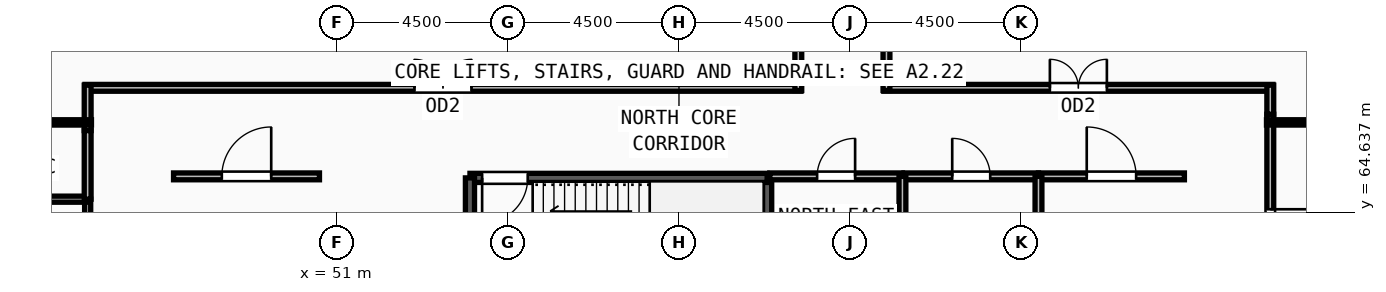
"""IFC4 building model, lengths in metres.
Left out: names, types, materials, properties, quantities, classifications, styles, units other than length and angle.
Written with IfcOpenShell. Run it as: python <this file> out.ifc"""

import sys

from ifc_helpers import new_model, si_unit, direction, frame, frame_2d, origin, place, context, subcontext, project, spatial, rectangle, extrude, source, transform, mapped, element, fill, save


model = new_model("IFC4")
c1 = context("Model", 3, precision=1e-05, world=origin(), true_north=direction((0.0, 1.0)))
c2 = subcontext(c1, "Body", "Model", "MODEL_VIEW")
j1 = project(units=[si_unit("LENGTHUNIT", "METRE"), si_unit("PLANEANGLEUNIT", "RADIAN")], contexts=[c1])
p1 = place(None, origin())
s1 = spatial("IfcSite", under=j1, at=p1, CompositionType="ELEMENT")
p2 = place(p1, origin())
s2 = spatial("IfcBuilding", under=s1, at=p2, CompositionType="ELEMENT")
p3 = place(p2, frame((0.0, 0.0, 258.75)))
s3 = spatial("IfcBuildingStorey", under=s2, at=p3, CompositionType="ELEMENT", Elevation=258.75)
p4 = place(p3, frame((62.32, 62.1, 0.0), z_axis=(0.0, 0.0, 1.0), x_axis=(0.0, 1.0, 0.0)))
e1 = element("IfcWall", 1, at=p4, inside=s3, PredefinedType="SOLIDWALL", context=c2, shape_type="SweptSolid", body=[
    extrude(rectangle(XDim=3.44, YDim=0.24, at=frame_2d((1.72, 0.0))), origin(), (0.0, 0.0, 1.0), 3.57),
])
p5 = place(p3, frame((62.32, 65.54, 0.0), z_axis=(0.0, 0.0, 1.0), x_axis=(-1.0, 0.0, 0.0)))
e2 = element("IfcWall", 2, at=p5, inside=s3, PredefinedType="SOLIDWALL", context=c2, shape_type="SweptSolid", body=[
    extrude(rectangle(XDim=7.82, YDim=0.24, at=frame_2d((3.91, 0.0))), origin(), (0.0, 0.0, 1.0), 3.57),
])
m1 = source(origin(), c2, "Body", "SweptSolid", [
    extrude(rectangle(XDim=1.2, YDim=2.2, at=frame_2d((0.6, 1.1))), frame((0.0, 0.13, 0.0), z_axis=(0.0, -1.0, 0.0), x_axis=(1.0, 0.0, 0.0)), (0.0, 0.0, 1.0), 0.26),
])
p6 = place(p5, frame((6.3, 0.0, 0.0)))
e3 = element("IfcOpeningElement", 3, at=p6, cuts=e2, PredefinedType="OPENING", context=c2, shape_type="MappedRepresentation", body=[
    mapped(m1, transform((0.0, 0.0, 0.0), x_axis=(1.0, 0.0, 0.0), y_axis=(0.0, 1.0, 0.0), z_axis=(0.0, 0.0, 1.0), scale=1.0)),
])
p7 = place(p3, frame((54.5, 65.54, 0.0), z_axis=(0.0, 0.0, 1.0), x_axis=(0.0, -1.0, 0.0)))
e4 = element("IfcWall", 4, at=p7, inside=s3, PredefinedType="SOLIDWALL", context=c2, shape_type="SweptSolid", body=[
    extrude(rectangle(XDim=3.44, YDim=0.24, at=frame_2d((1.72, 0.0))), origin(), (0.0, 0.0, 1.0), 3.57),
])
p8 = place(p3, frame((44.44, 62.24, 0.0), z_axis=(0.0, 0.0, 1.0), x_axis=(0.0, 1.0, 0.0)))
e5 = element("IfcWall", 5, at=p8, inside=s3, PredefinedType="PARTITIONING", context=c2, shape_type="SweptSolid", body=[
    extrude(rectangle(XDim=2.74, YDim=0.16, at=frame_2d((1.37, 0.0))), origin(), (0.0, 0.0, 1.0), 3.57),
])
m2 = source(origin(), c2, "Body", "SweptSolid", [
    extrude(rectangle(XDim=1.05, YDim=2.15, at=frame_2d((0.525, 1.075))), frame((0.0, 0.09, 0.0), z_axis=(0.0, -1.0, 0.0), x_axis=(1.0, 0.0, 0.0)), (0.0, 0.0, 1.0), 0.18),
])
p9 = place(p8, frame((0.845, 0.0, 0.0)))
e6 = element("IfcOpeningElement", 6, at=p9, cuts=e5, PredefinedType="OPENING", context=c2, shape_type="MappedRepresentation", body=[
    mapped(m2, transform((0.0, 0.0, 0.0), x_axis=(1.0, 0.0, 0.0), y_axis=(0.0, 1.0, 0.0), z_axis=(0.0, 0.0, 1.0), scale=1.0)),
])
p10 = place(p3, frame((62.39, 65.58, 0.0), z_axis=(0.0, 0.0, 1.0), x_axis=(1.0, 0.0, 0.0)))
e7 = element("IfcWall", 7, at=p10, inside=s3, PredefinedType="PARTITIONING", context=c2, shape_type="SweptSolid", body=[
    extrude(rectangle(XDim=3.49, YDim=0.18, at=frame_2d((1.745, 0.0))), origin(), (0.0, 0.0, 1.0), 3.57),
])
m3 = source(origin(), c2, "Body", "SweptSolid", [
    extrude(rectangle(XDim=1.0, YDim=2.2, at=frame_2d((0.5, 1.1))), frame((0.0, 0.1, 0.0), z_axis=(0.0, -1.0, 0.0), x_axis=(1.0, 0.0, 0.0)), (0.0, 0.0, 1.0), 0.2),
])
p11 = place(p10, frame((1.245, 0.0, 0.0)))
e8 = element("IfcOpeningElement", 8, at=p11, cuts=e7, PredefinedType="OPENING", context=c2, shape_type="MappedRepresentation", body=[
    mapped(m3, transform((0.0, 0.0, 0.0), x_axis=(1.0, 0.0, 0.0), y_axis=(0.0, 1.0, 0.0), z_axis=(0.0, 0.0, 1.0), scale=1.0)),
])
p12 = place(p3, frame((65.92, 65.58, 0.0), z_axis=(0.0, 0.0, 1.0), x_axis=(1.0, 0.0, 0.0)))
e9 = element("IfcWall", 9, at=p12, inside=s3, PredefinedType="PARTITIONING", context=c2, shape_type="SweptSolid", body=[
    extrude(rectangle(XDim=3.54, YDim=0.18, at=frame_2d((1.77, 0.0))), origin(), (0.0, 0.0, 1.0), 3.57),
])
p13 = place(p12, frame((1.27, 0.0, 0.0)))
e10 = element("IfcOpeningElement", 10, at=p13, cuts=e9, PredefinedType="OPENING", context=c2, shape_type="MappedRepresentation", body=[
    mapped(m3, transform((0.0, 0.0, 0.0), x_axis=(1.0, 0.0, 0.0), y_axis=(0.0, 1.0, 0.0), z_axis=(0.0, 0.0, 1.0), scale=1.0)),
])
p14 = place(p3, frame((46.7, 65.58, 0.0), z_axis=(0.0, 0.0, 1.0), x_axis=(1.0, 0.0, 0.0)))
e11 = element("IfcWall", 11, at=p14, inside=s3, PredefinedType="PARTITIONING", context=c2, shape_type="SweptSolid", body=[
    extrude(rectangle(XDim=3.84, YDim=0.18, at=frame_2d((1.92, 0.0))), origin(), (0.0, 0.0, 1.0), 3.57),
])
m4 = source(origin(), c2, "Body", "SweptSolid", [
    extrude(rectangle(XDim=1.3, YDim=2.2, at=frame_2d((0.65, 1.1))), frame((0.0, 0.1, 0.0), z_axis=(0.0, -1.0, 0.0), x_axis=(1.0, 0.0, 0.0)), (0.0, 0.0, 1.0), 0.2),
])
p15 = place(p14, frame((1.27, 0.0, 0.0)))
e12 = element("IfcOpeningElement", 12, at=p15, cuts=e11, PredefinedType="OPENING", context=c2, shape_type="MappedRepresentation", body=[
    mapped(m4, transform((0.0, 0.0, 0.0), x_axis=(1.0, 0.0, 0.0), y_axis=(0.0, 1.0, 0.0), z_axis=(0.0, 0.0, 1.0), scale=1.0)),
])
p16 = place(p3, frame((69.46, 65.58, 0.0), z_axis=(0.0, 0.0, 1.0), x_axis=(1.0, 0.0, 0.0)))
e13 = element("IfcWall", 13, at=p16, inside=s3, PredefinedType="PARTITIONING", context=c2, shape_type="SweptSolid", body=[
    extrude(rectangle(XDim=3.84, YDim=0.18, at=frame_2d((1.92, 0.0))), origin(), (0.0, 0.0, 1.0), 3.57),
])
p17 = place(p16, frame((1.27, 0.0, 0.0)))
e14 = element("IfcOpeningElement", 14, at=p17, cuts=e13, PredefinedType="OPENING", context=c2, shape_type="MappedRepresentation", body=[
    mapped(m4, transform((0.0, 0.0, 0.0), x_axis=(1.0, 0.0, 0.0), y_axis=(0.0, 1.0, 0.0), z_axis=(0.0, 0.0, 1.0), scale=1.0)),
])
p18 = place(p3, frame((75.56, 67.215, 0.0), z_axis=(0.0, 0.0, 1.0), x_axis=(0.0, -1.0, 0.0)))
e15 = element("IfcWall", 15, at=p18, inside=s3, PredefinedType="PARTITIONING", context=c2, shape_type="SweptSolid", body=[
    extrude(rectangle(XDim=6.0, YDim=0.18, at=frame_2d((3.0, 0.0))), origin(), (0.0, 0.0, 1.0), 3.57),
])
p19 = place(p18, frame((2.5, 0.0, 0.0)))
e16 = element("IfcOpeningElement", 16, at=p19, cuts=e15, PredefinedType="OPENING", context=c2, shape_type="MappedRepresentation", body=[
    mapped(m3, transform((0.0, 0.0, 0.0), x_axis=(1.0, 0.0, 0.0), y_axis=(0.0, 1.0, 0.0), z_axis=(0.0, 0.0, 1.0), scale=1.0)),
])
p20 = place(p3, frame((65.39, 67.91, 0.0), z_axis=(0.0, 0.0, 1.0), x_axis=(1.0, 0.0, 0.0)))
e17 = element("IfcWall", 17, at=p20, inside=s3, PredefinedType="PARTITIONING", context=c2, shape_type="SweptSolid", body=[
    extrude(rectangle(XDim=10.24, YDim=0.18, at=frame_2d((5.12, 0.0))), origin(), (0.0, 0.0, 1.0), 3.205),
])
m5 = source(origin(), c2, "Body", "SweptSolid", [
    extrude(rectangle(XDim=1.5, YDim=2.2, at=frame_2d((0.75, 1.1))), frame((0.0, 0.1, 0.0), z_axis=(0.0, -1.0, 0.0), x_axis=(1.0, 0.0, 0.0)), (0.0, 0.0, 1.0), 0.2),
])
p21 = place(p20, frame((4.37, 0.0, 0.0)))
e18 = element("IfcOpeningElement", 18, at=p21, cuts=e17, PredefinedType="OPENING", context=c2, shape_type="MappedRepresentation", body=[
    mapped(m5, transform((0.0, 0.0, 0.0), x_axis=(1.0, 0.0, 0.0), y_axis=(0.0, 1.0, 0.0), z_axis=(0.0, 0.0, 1.0), scale=1.0)),
])
p22 = place(p3, frame((44.37, 67.91, 0.0), z_axis=(0.0, 0.0, 1.0), x_axis=(1.0, 0.0, 0.0)))
e19 = element("IfcWall", 19, at=p22, inside=s3, PredefinedType="PARTITIONING", context=c2, shape_type="SweptSolid", body=[
    extrude(rectangle(XDim=18.84, YDim=0.18, at=frame_2d((9.42, 0.0))), origin(), (0.0, 0.0, 1.0), 3.205),
])
p23 = place(p22, frame((8.67, 0.0, 0.0)))
e20 = element("IfcOpeningElement", 20, at=p23, cuts=e19, PredefinedType="OPENING", context=c2, shape_type="MappedRepresentation", body=[
    mapped(m5, transform((0.0, 0.0, 0.0), x_axis=(1.0, 0.0, 0.0), y_axis=(0.0, 1.0, 0.0), z_axis=(0.0, 0.0, 1.0), scale=1.0)),
])
p24 = place(p3, frame((39.98, 64.98, 0.0), z_axis=(0.0, 0.0, 1.0), x_axis=(1.0, 0.0, 0.0)))
e21 = element("IfcWall", 21, at=p24, inside=s3, PredefinedType="PARTITIONING", context=c2, shape_type="SweptSolid", body=[
    extrude(rectangle(XDim=4.46, YDim=0.16, at=frame_2d((2.23, 0.0))), origin(), (0.0, 0.0, 1.0), 3.57),
])
p25 = place(p3, frame((65.88, 61.825, 0.0), z_axis=(0.0, 0.0, 1.0), x_axis=(0.0, 1.0, 0.0)))
e22 = element("IfcWall", 22, at=p25, inside=s3, PredefinedType="PARTITIONING", context=c2, shape_type="SweptSolid", body=[
    extrude(rectangle(XDim=3.755, YDim=0.18, at=frame_2d((1.877, 0.0))), origin(), (0.0, 0.0, 1.0), 3.57),
])
p26 = place(p3, frame((69.46, 61.95, 0.0), z_axis=(0.0, 0.0, 1.0), x_axis=(0.0, 1.0, 0.0)))
e23 = element("IfcWall", 23, at=p26, inside=s3, PredefinedType="PARTITIONING", context=c2, shape_type="SweptSolid", body=[
    extrude(rectangle(XDim=3.63, YDim=0.18, at=frame_2d((1.815, 0.0))), origin(), (0.0, 0.0, 1.0), 3.57),
])
p27 = place(p3, frame((65.46, 77.455, 0.0), z_axis=(0.0, 0.0, 1.0), x_axis=(0.0, -1.0, 0.0)))
e24 = element("IfcWall", 24, at=p27, inside=s3, PredefinedType="PARTITIONING", context=c2, shape_type="SweptSolid", body=[
    extrude(rectangle(XDim=9.615, YDim=0.18, at=frame_2d((4.808, 0.0))), origin(), (0.0, 0.0, 1.0), 3.57),
])
p28 = place(p3, frame((75.56, 67.98, 0.0), z_axis=(0.0, 0.0, 1.0), x_axis=(0.0, -1.0, 0.0)))
e25 = element("IfcWall", 25, at=p28, inside=s3, PredefinedType="PARTITIONING", context=c2, shape_type="SweptSolid", body=[
    extrude(rectangle(XDim=0.765, YDim=0.18, at=frame_2d((0.382, 0.0))), origin(), (0.0, 0.0, 1.0), 3.57),
])
p29 = place(p3, frame((63.14, 67.84, 0.0), z_axis=(0.0, 0.0, 1.0), x_axis=(0.0, 1.0, 0.0)))
e26 = element("IfcWall", 26, at=p29, inside=s3, PredefinedType="PARTITIONING", context=c2, shape_type="SweptSolid", body=[
    extrude(rectangle(XDim=9.795, YDim=0.18, at=frame_2d((4.897, 0.0))), origin(), (0.0, 0.0, 1.0), 3.57),
])
p30 = place(p3, frame((44.44, 66.785, 0.0), z_axis=(0.0, 0.0, 1.0), x_axis=(0.0, 1.0, 0.0)))
e27 = element("IfcWall", 27, at=p30, inside=s3, PredefinedType="PARTITIONING", context=c2, shape_type="SweptSolid", body=[
    extrude(rectangle(XDim=1.195, YDim=0.18, at=frame_2d((0.598, 0.0))), origin(), (0.0, 0.0, 1.0), 3.57),
])
p31 = place(p3, frame((44.44, 64.98, 0.0), z_axis=(0.0, 0.0, 1.0), x_axis=(0.0, 1.0, 0.0)))
e28 = element("IfcWall", 28, at=p31, inside=s3, PredefinedType="PARTITIONING", context=c2, shape_type="SweptSolid", body=[
    extrude(rectangle(XDim=1.805, YDim=0.18, at=frame_2d((0.902, 0.0))), origin(), (0.0, 0.0, 1.0), 3.57),
])
for number, where, z_axis, x_axis in (
    (29, (44.54, 67.0, 0.0), (0.0, 0.0, 1.0), (-1.0, 0.0, 0.0)),
    (30, (75.46, 67.0, 0.0), (0.0, 0.0, 1.0), (1.0, 0.0, 0.0)),
):
    element("IfcWall", number, at=place(p3, frame(where, z_axis=z_axis, x_axis=x_axis)), inside=s3, PredefinedType="PARTITIONING", context=c2, shape_type="SweptSolid", body=[
        extrude(rectangle(XDim=16.449, YDim=0.14, at=frame_2d((8.225, 0.0))), origin(), (0.0, 0.0, 1.0), 3.57),
    ])
m6 = source(origin(), c2, "Body", "SweptSolid", [
    extrude(rectangle(XDim=1.2, YDim=2.2, at=frame_2d((0.6, 1.1))), frame((0.0, 0.025, 0.0), z_axis=(0.0, -1.0, 0.0), x_axis=(1.0, 0.0, 0.0)), (0.0, 0.0, 1.0), 0.05),
])
p32 = place(p6, origin())
e31 = element("IfcDoor", 31, at=p32, inside=s3, OperationType="SINGLE_SWING_RIGHT", PredefinedType="DOOR", context=c2, shape_type="MappedRepresentation", body=[
    mapped(m6, transform((0.0, 0.0, 0.0), x_axis=(1.0, 0.0, 0.0), y_axis=(0.0, 1.0, 0.0), z_axis=(0.0, 0.0, 1.0), scale=1.0)),
])
fill(e3, e31)
m7 = source(origin(), c2, "Body", "SweptSolid", [
    extrude(rectangle(XDim=1.0, YDim=2.2, at=frame_2d((0.5, 1.1))), frame((0.0, 0.025, 0.0), z_axis=(0.0, -1.0, 0.0), x_axis=(1.0, 0.0, 0.0)), (0.0, 0.0, 1.0), 0.05),
])
p33 = place(p11, origin())
e32 = element("IfcDoor", 32, at=p33, inside=s3, OperationType="SINGLE_SWING_RIGHT", PredefinedType="DOOR", context=c2, shape_type="MappedRepresentation", body=[
    mapped(m7, transform((0.0, 0.0, 0.0), x_axis=(1.0, 0.0, 0.0), y_axis=(0.0, 1.0, 0.0), z_axis=(0.0, 0.0, 1.0), scale=1.0)),
])
fill(e8, e32)
p34 = place(p13, origin())
e33 = element("IfcDoor", 33, at=p34, inside=s3, OperationType="SINGLE_SWING_LEFT", PredefinedType="DOOR", context=c2, shape_type="MappedRepresentation", body=[
    mapped(m7, transform((0.0, 0.0, 0.0), x_axis=(1.0, 0.0, 0.0), y_axis=(0.0, 1.0, 0.0), z_axis=(0.0, 0.0, 1.0), scale=1.0)),
])
fill(e10, e33)
m8 = source(origin(), c2, "Body", "SweptSolid", [
    extrude(rectangle(XDim=1.3, YDim=2.2, at=frame_2d((0.65, 1.1))), frame((0.0, 0.025, 0.0), z_axis=(0.0, -1.0, 0.0), x_axis=(1.0, 0.0, 0.0)), (0.0, 0.0, 1.0), 0.05),
])
p35 = place(p15, origin())
e34 = element("IfcDoor", 34, at=p35, inside=s3, OperationType="SINGLE_SWING_RIGHT", PredefinedType="DOOR", context=c2, shape_type="MappedRepresentation", body=[
    mapped(m8, transform((0.0, 0.0, 0.0), x_axis=(1.0, 0.0, 0.0), y_axis=(0.0, 1.0, 0.0), z_axis=(0.0, 0.0, 1.0), scale=1.0)),
])
fill(e12, e34)
p36 = place(p17, origin())
e35 = element("IfcDoor", 35, at=p36, inside=s3, OperationType="SINGLE_SWING_LEFT", PredefinedType="DOOR", context=c2, shape_type="MappedRepresentation", body=[
    mapped(m8, transform((0.0, 0.0, 0.0), x_axis=(1.0, 0.0, 0.0), y_axis=(0.0, 1.0, 0.0), z_axis=(0.0, 0.0, 1.0), scale=1.0)),
])
fill(e14, e35)
p37 = place(p19, origin())
e36 = element("IfcDoor", 36, at=p37, inside=s3, OperationType="SINGLE_SWING_LEFT", PredefinedType="DOOR", context=c2, shape_type="MappedRepresentation", body=[
    mapped(m7, transform((0.0, 0.0, 0.0), x_axis=(1.0, 0.0, 0.0), y_axis=(0.0, 1.0, 0.0), z_axis=(0.0, 0.0, 1.0), scale=1.0)),
])
fill(e16, e36)
m9 = source(origin(), c2, "Body", "SweptSolid", [
    extrude(rectangle(XDim=1.5, YDim=2.2, at=frame_2d((0.75, 1.1))), frame((0.0, 0.025, 0.0), z_axis=(0.0, -1.0, 0.0), x_axis=(1.0, 0.0, 0.0)), (0.0, 0.0, 1.0), 0.05),
])
p38 = place(p21, origin())
e37 = element("IfcDoor", 37, at=p38, inside=s3, OperationType="DOUBLE_DOOR_SINGLE_SWING", PredefinedType="DOOR", context=c2, shape_type="MappedRepresentation", body=[
    mapped(m9, transform((0.0, 0.0, 0.0), x_axis=(1.0, 0.0, 0.0), y_axis=(0.0, 1.0, 0.0), z_axis=(0.0, 0.0, 1.0), scale=1.0)),
])
fill(e18, e37)
p39 = place(p23, origin())
e38 = element("IfcDoor", 38, at=p39, inside=s3, OperationType="DOUBLE_DOOR_SINGLE_SWING", PredefinedType="DOOR", context=c2, shape_type="MappedRepresentation", body=[
    mapped(m9, transform((0.0, 0.0, 0.0), x_axis=(1.0, 0.0, 0.0), y_axis=(0.0, 1.0, 0.0), z_axis=(0.0, 0.0, 1.0), scale=1.0)),
])
fill(e20, e38)
save(model, sys.argv[1])
